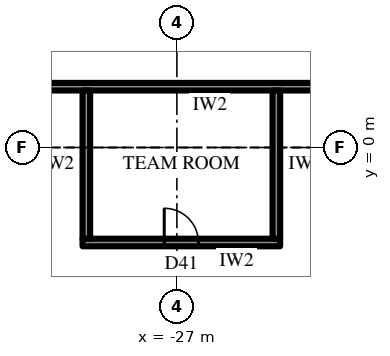
"""IFC4 building model, lengths in metres.
Left out: names, types, materials, properties, quantities, classifications, styles, units other than length and angle.
Written with IfcOpenShell. Run it as: python <this file> out.ifc"""

import sys

from ifc_helpers import new_model, si_unit, direction, frame, frame_2d, origin, place, context, subcontext, project, spatial, rectangle, extrude, element, fill, save


model = new_model("IFC4")
c1 = context("Model", 3, precision=1e-05, world=origin(), true_north=direction((0.0, 1.0)))
c2 = subcontext(c1, "Body", "Model", "MODEL_VIEW")
j1 = project(units=[si_unit("LENGTHUNIT", "METRE"), si_unit("PLANEANGLEUNIT", "RADIAN")], contexts=[c1])
p1 = place(None, origin())
s1 = spatial("IfcSite", under=j1, at=p1, CompositionType="ELEMENT")
p2 = place(p1, origin())
s2 = spatial("IfcBuilding", under=s1, at=p2, CompositionType="ELEMENT")
p3 = place(p2, frame((0.0, 0.0, 178.3)))
s3 = spatial("IfcBuildingStorey", under=s2, at=p3, CompositionType="ELEMENT", Elevation=178.3)
p4 = place(p3, frame((-34.656, -2.675, 0.0), z_axis=(0.0, 0.0, 1.0), x_axis=(0.500003084452, -0.866023622968, 0.0)))
e1 = element("IfcWall", 1, at=p4, inside=s3, PredefinedType="SOLIDWALL", context=c2, shape_type="SweptSolid", body=[
    extrude(rectangle(XDim=30.022, YDim=0.3, at=frame_2d((15.011, 0.0))), origin(), (0.0, 0.0, 1.0), 2.75),
])
p5 = place(p4, frame((1.052, 0.0, 0.6)))
e2 = element("IfcOpeningElement", 2, at=p5, cuts=e1, PredefinedType="OPENING", context=c2, shape_type="SweptSolid", body=[
    extrude(rectangle(XDim=2.9, YDim=1.9, at=frame_2d((1.45, 0.95))), frame((0.0, 0.16, 0.0), z_axis=(0.0, -1.0, 0.0), x_axis=(1.0, 0.0, 0.0)), (0.0, 0.0, 1.0), 0.32),
])
p6 = place(p4, frame((6.056, 0.0, 0.6)))
e3 = element("IfcOpeningElement", 3, at=p6, cuts=e1, PredefinedType="OPENING", context=c2, shape_type="SweptSolid", body=[
    extrude(rectangle(XDim=2.9, YDim=1.9, at=frame_2d((1.45, 0.95))), frame((0.0, 0.16, 0.0), z_axis=(0.0, -1.0, 0.0), x_axis=(1.0, 0.0, 0.0)), (0.0, 0.0, 1.0), 0.32),
])
p7 = place(p4, frame((11.909, 0.0, 0.0)))
e4 = element("IfcOpeningElement", 4, at=p7, cuts=e1, PredefinedType="OPENING", context=c2, shape_type="SweptSolid", body=[
    extrude(rectangle(XDim=1.2, YDim=2.4, at=frame_2d((0.6, 1.2))), frame((0.0, 0.16, 0.0), z_axis=(0.0, -1.0, 0.0), x_axis=(1.0, 0.0, 0.0)), (0.0, 0.0, 1.0), 0.32),
])
p8 = place(p4, frame((16.063, 0.0, 0.6)))
e5 = element("IfcOpeningElement", 5, at=p8, cuts=e1, PredefinedType="OPENING", context=c2, shape_type="SweptSolid", body=[
    extrude(rectangle(XDim=2.9, YDim=1.9, at=frame_2d((1.45, 0.95))), frame((0.0, 0.16, 0.0), z_axis=(0.0, -1.0, 0.0), x_axis=(1.0, 0.0, 0.0)), (0.0, 0.0, 1.0), 0.32),
])
p9 = place(p4, frame((21.067, 0.0, 0.6)))
e6 = element("IfcOpeningElement", 6, at=p9, cuts=e1, PredefinedType="OPENING", context=c2, shape_type="SweptSolid", body=[
    extrude(rectangle(XDim=2.9, YDim=1.9, at=frame_2d((1.45, 0.95))), frame((0.0, 0.16, 0.0), z_axis=(0.0, -1.0, 0.0), x_axis=(1.0, 0.0, 0.0)), (0.0, 0.0, 1.0), 0.32),
])
p10 = place(p4, frame((26.07, 0.0, 0.6)))
e7 = element("IfcOpeningElement", 7, at=p10, cuts=e1, PredefinedType="OPENING", context=c2, shape_type="SweptSolid", body=[
    extrude(rectangle(XDim=2.9, YDim=1.9, at=frame_2d((1.45, 0.95))), frame((0.0, 0.16, 0.0), z_axis=(0.0, -1.0, 0.0), x_axis=(1.0, 0.0, 0.0)), (0.0, 0.0, 1.0), 0.32),
])
p11 = place(p3, frame((-18.6, 1.6, 0.0), z_axis=(0.0, 0.0, 1.0), x_axis=(-1.0, 0.0, 0.0)))
e8 = element("IfcWall", 8, at=p11, inside=s3, PredefinedType="PARTITIONING", context=c2, shape_type="SweptSolid", body=[
    extrude(rectangle(XDim=15.059, YDim=0.2, at=frame_2d((7.53, 0.0))), origin(), (0.0, 0.0, 1.0), 4.0),
])
p12 = place(p11, frame((1.006, 0.0, 0.0)))
e9 = element("IfcOpeningElement", 9, at=p12, cuts=e8, PredefinedType="OPENING", context=c2, shape_type="SweptSolid", body=[
    extrude(rectangle(XDim=1.0, YDim=2.2, at=frame_2d((0.5, 1.1))), frame((0.0, 0.11, 0.0), z_axis=(0.0, -1.0, 0.0), x_axis=(1.0, 0.0, 0.0)), (0.0, 0.0, 1.0), 0.22),
])
p13 = place(p3, frame((-24.283, -2.5, 0.0), z_axis=(0.0, 0.0, 1.0), x_axis=(-1.0, 0.0, 0.0)))
e10 = element("IfcWall", 10, at=p13, inside=s3, PredefinedType="PARTITIONING", context=c2, shape_type="SweptSolid", body=[
    extrude(rectangle(XDim=5.2, YDim=0.2, at=frame_2d((2.6, 0.0))), origin(), (0.0, 0.0, 1.0), 4.0),
])
p14 = place(p13, frame((2.15, 0.0, 0.0)))
e11 = element("IfcOpeningElement", 11, at=p14, cuts=e10, PredefinedType="OPENING", context=c2, shape_type="SweptSolid", body=[
    extrude(rectangle(XDim=0.9, YDim=2.2, at=frame_2d((0.45, 1.1))), frame((0.0, 0.11, 0.0), z_axis=(0.0, -1.0, 0.0), x_axis=(1.0, 0.0, 0.0)), (0.0, 0.0, 1.0), 0.22),
])
for number, where, z_axis, x_axis in (
    (12, (-24.383, 1.5, 0.0), (0.0, 0.0, 1.0), (0.0, -1.0, 0.0)),
    (13, (-29.383, 1.5, 0.0), (0.0, 0.0, 1.0), (0.0, -1.0, 0.0)),
):
    element("IfcWall", number, at=place(p3, frame(where, z_axis=z_axis, x_axis=x_axis)), inside=s3, PredefinedType="PARTITIONING", context=c2, shape_type="SweptSolid", body=[
        extrude(rectangle(XDim=3.9, YDim=0.2, at=frame_2d((1.95, 0.0))), origin(), (0.0, 0.0, 1.0), 4.0),
    ])
p15 = place(p14, frame((0.9, 0.0, 0.0), z_axis=(0.0, 0.0, 1.0), x_axis=(-1.0, 0.0, 0.0)))
e14 = element("IfcDoor", 14, at=p15, inside=s3, OperationType="SINGLE_SWING_RIGHT", PredefinedType="DOOR", context=c2, shape_type="SweptSolid", body=[
    extrude(rectangle(XDim=0.9, YDim=2.2, at=frame_2d((0.45, 1.1))), frame((0.0, 0.025, 0.0), z_axis=(0.0, -1.0, 0.0), x_axis=(1.0, 0.0, 0.0)), (0.0, 0.0, 1.0), 0.05),
])
fill(e11, e14)
save(model, sys.argv[1])
